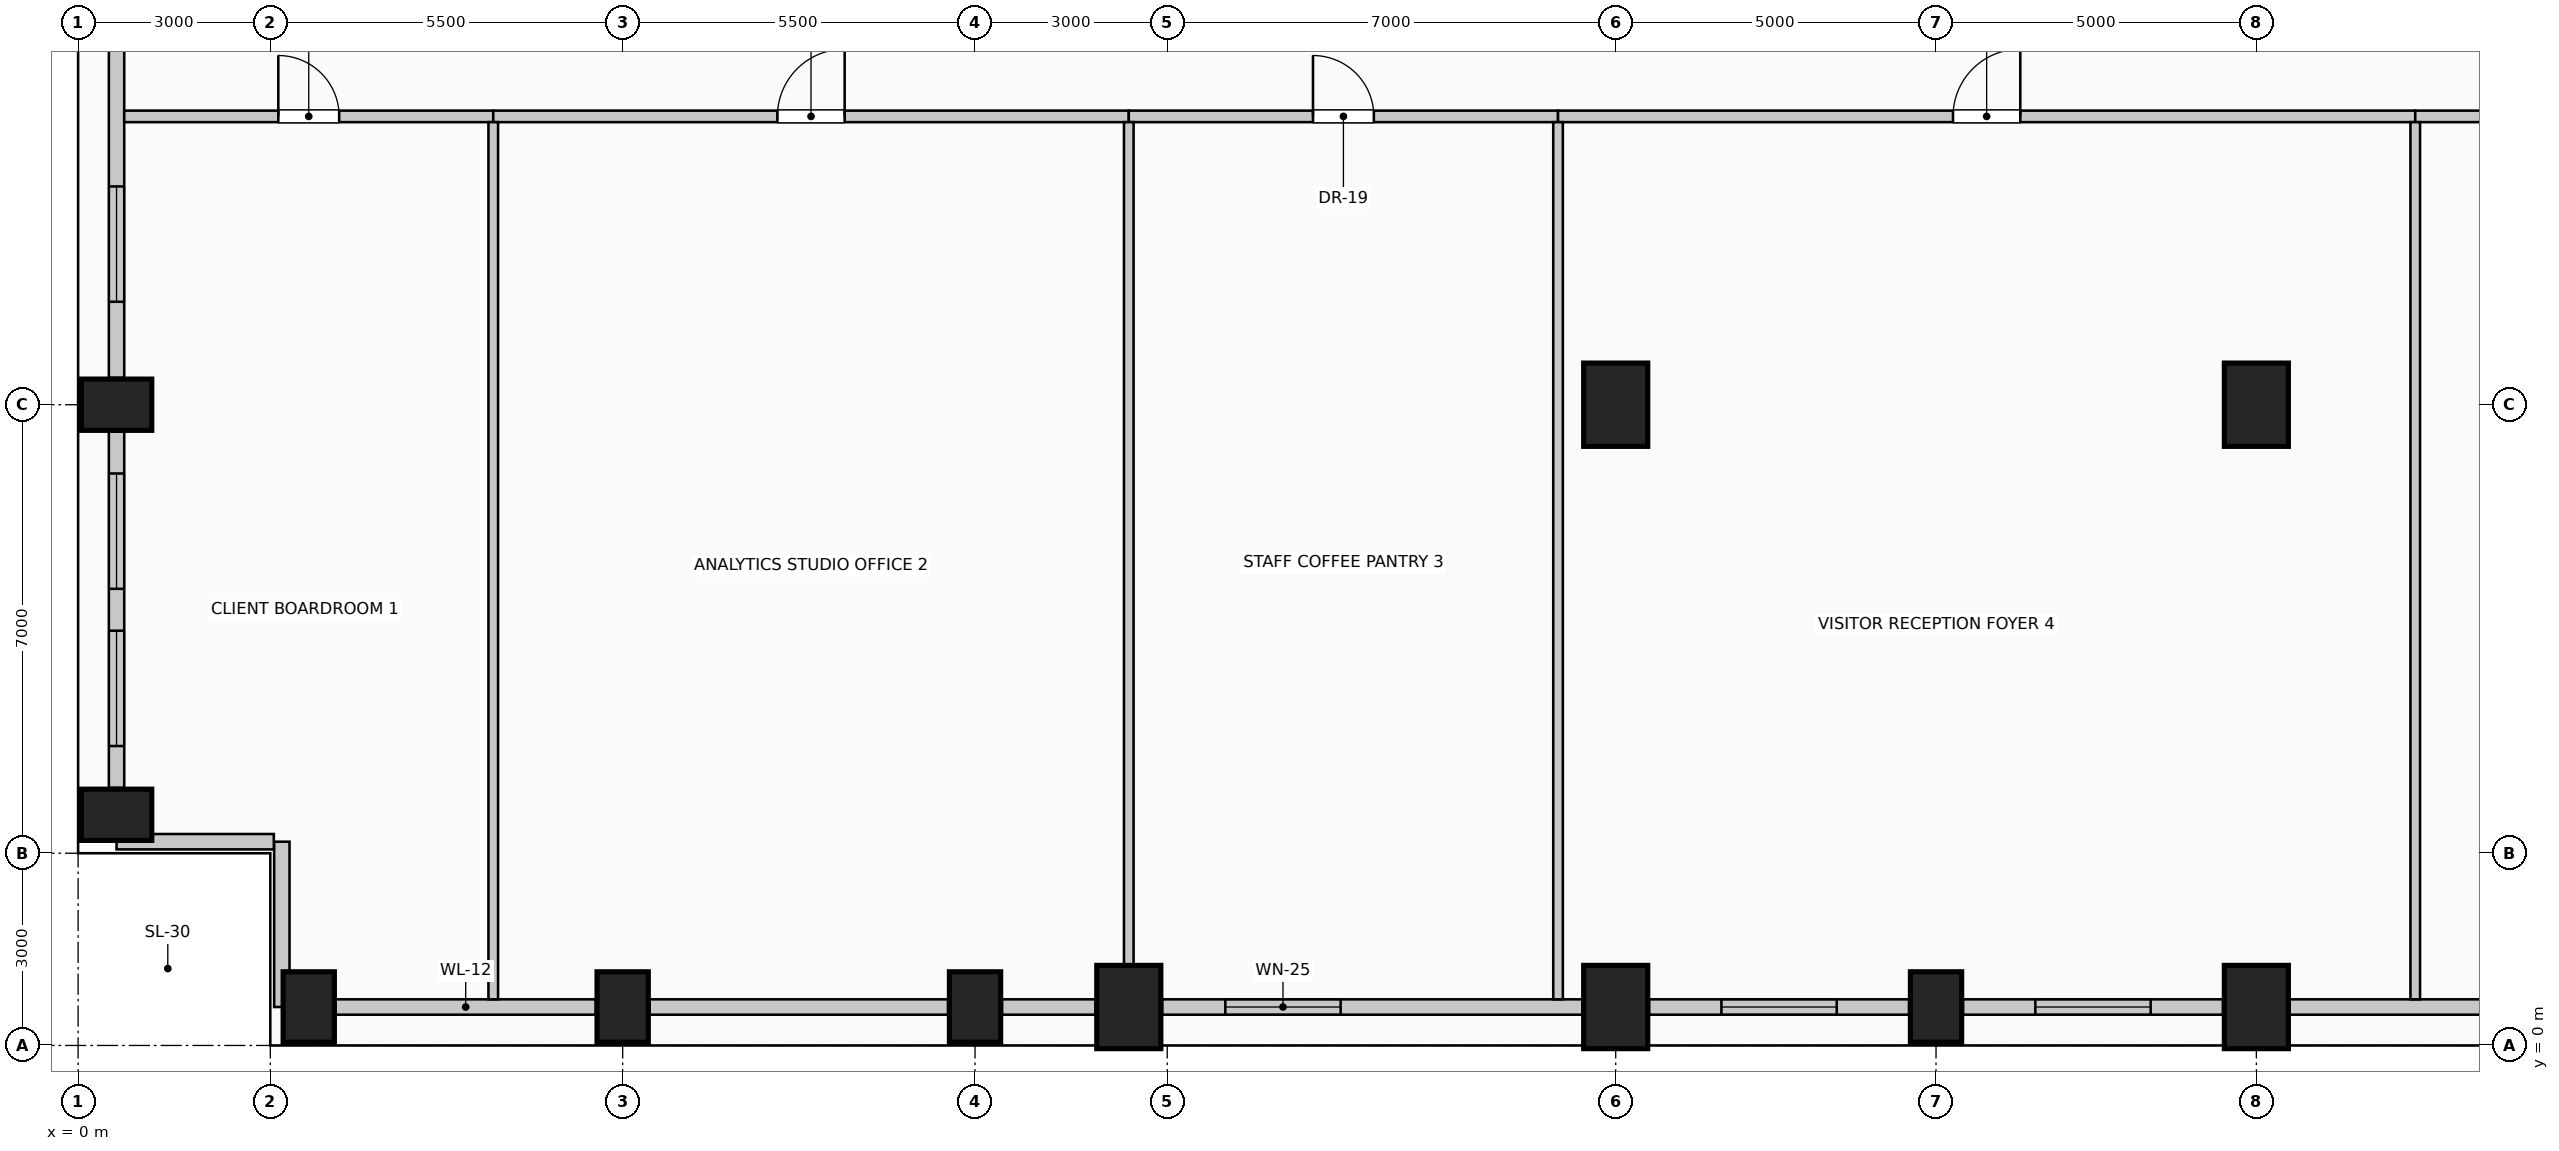
"""IFC4 building model, lengths in metres.
Left out: names, types, materials, properties, quantities, classifications, styles, units other than length and angle.
Written with IfcOpenShell. Run it as: python <this file> out.ifc"""

import sys

from ifc_helpers import new_model, si_unit, direction, frame, frame_2d, origin, origin_2d, place, context, subcontext, project, spatial, rectangle, extrude, element, fill, save


model = new_model("IFC4")
c1 = context("Model", 3, precision=1e-05, world=origin(), true_north=direction((0.0, 1.0)))
c2 = subcontext(c1, "Body", "Model", "MODEL_VIEW")
j1 = project(units=[si_unit("LENGTHUNIT", "METRE"), si_unit("PLANEANGLEUNIT", "RADIAN")], contexts=[c1])
p1 = place(None, origin())
s1 = spatial("IfcSite", under=j1, at=p1, CompositionType="ELEMENT")
p2 = place(p1, origin())
s2 = spatial("IfcBuilding", under=s1, at=p2, CompositionType="ELEMENT")
p3 = place(p2, frame((0.0, 0.0, 206.6)))
s3 = spatial("IfcBuildingStorey", under=s2, at=p3, CompositionType="ELEMENT", Elevation=206.6)
for number, where, z_axis, x_axis in (
    (1, (3.6, 0.6, 0.0), (0.0, 0.0, 1.0), (1.0, 0.0, 0.0)),
    (2, (8.5, 0.6, 0.0), (0.0, 0.0, 1.0), (1.0, 0.0, 0.0)),
    (3, (14.0, 0.6, 0.0), (0.0, 0.0, 1.0), (1.0, 0.0, 0.0)),
):
    element("IfcColumn", number, at=place(p3, frame(where, z_axis=z_axis, x_axis=x_axis)), inside=s3, PredefinedType="COLUMN", context=c2, shape_type="SweptSolid", body=[
        extrude(rectangle(XDim=0.8, YDim=1.1, at=origin_2d()), origin(), (0.0, 0.0, 1.0), 4.0),
    ])
for number, where, z_axis, x_axis in (
    (4, (16.4, 0.6, 0.0), (0.0, 0.0, 1.0), (1.0, 0.0, 0.0)),
    (5, (24.0, 0.6, 0.0), (0.0, 0.0, 1.0), (1.0, 0.0, 0.0)),
):
    element("IfcColumn", number, at=place(p3, frame(where, z_axis=z_axis, x_axis=x_axis)), inside=s3, PredefinedType="COLUMN", context=c2, shape_type="SweptSolid", body=[
        extrude(rectangle(XDim=1.0, YDim=1.3, at=origin_2d()), origin(), (0.0, 0.0, 1.0), 4.0),
    ])
p4 = place(p3, frame((29.0, 0.6, 0.0), z_axis=(0.0, 0.0, 1.0), x_axis=(1.0, 0.0, 0.0)))
e6 = element("IfcColumn", 6, at=p4, inside=s3, PredefinedType="COLUMN", context=c2, shape_type="SweptSolid", body=[
    extrude(rectangle(XDim=0.8, YDim=1.1, at=origin_2d()), origin(), (0.0, 0.0, 1.0), 4.0),
])
p5 = place(p3, frame((34.0, 0.6, 0.0), z_axis=(0.0, 0.0, 1.0), x_axis=(1.0, 0.0, 0.0)))
e7 = element("IfcColumn", 7, at=p5, inside=s3, PredefinedType="COLUMN", context=c2, shape_type="SweptSolid", body=[
    extrude(rectangle(XDim=1.0, YDim=1.3, at=origin_2d()), origin(), (0.0, 0.0, 1.0), 4.0),
])
for number, where, z_axis, x_axis in (
    (8, (0.6, 3.6, 0.0), (0.0, 0.0, 1.0), (0.0, 1.0, 0.0)),
    (9, (0.6, 10.0, 0.0), (0.0, 0.0, 1.0), (0.0, 1.0, 0.0)),
):
    element("IfcColumn", number, at=place(p3, frame(where, z_axis=z_axis, x_axis=x_axis)), inside=s3, PredefinedType="COLUMN", context=c2, shape_type="SweptSolid", body=[
        extrude(rectangle(XDim=0.8, YDim=1.1, at=origin_2d()), origin(), (0.0, 0.0, 1.0), 4.0),
    ])
for number, where, z_axis, x_axis in (
    (10, (24.0, 10.0, 0.0), (0.0, 0.0, 1.0), (1.0, 0.0, 0.0)),
    (11, (34.0, 10.0, 0.0), (0.0, 0.0, 1.0), (1.0, 0.0, 0.0)),
):
    element("IfcColumn", number, at=place(p3, frame(where, z_axis=z_axis, x_axis=x_axis)), inside=s3, PredefinedType="COLUMN", context=c2, shape_type="SweptSolid", body=[
        extrude(rectangle(XDim=1.0, YDim=1.3, at=origin_2d()), origin(), (0.0, 0.0, 1.0), 4.0),
    ])
p6 = place(p3, frame((8.08, 0.6, 0.0), z_axis=(0.0, 0.0, 1.0), x_axis=(-1.0, 0.0, 0.0)))
e12 = element("IfcWall", 12, at=p6, inside=s3, PredefinedType="SOLIDWALL", context=c2, shape_type="SweptSolid", body=[
    extrude(rectangle(XDim=4.06, YDim=0.24, at=frame_2d((2.03, 0.0))), origin(), (0.0, 0.0, 1.0), 3.0),
])
p7 = place(p3, frame((13.58, 0.6, 0.0), z_axis=(0.0, 0.0, 1.0), x_axis=(-1.0, 0.0, 0.0)))
e13 = element("IfcWall", 13, at=p7, inside=s3, PredefinedType="SOLIDWALL", context=c2, shape_type="SweptSolid", body=[
    extrude(rectangle(XDim=4.66, YDim=0.24, at=frame_2d((2.33, 0.0))), origin(), (0.0, 0.0, 1.0), 3.0),
])
p8 = place(p3, frame((15.88, 0.6, 0.0), z_axis=(0.0, 0.0, 1.0), x_axis=(-1.0, 0.0, 0.0)))
e14 = element("IfcWall", 14, at=p8, inside=s3, PredefinedType="SOLIDWALL", context=c2, shape_type="SweptSolid", body=[
    extrude(rectangle(XDim=1.46, YDim=0.24, at=frame_2d((0.73, 0.0))), origin(), (0.0, 0.0, 1.0), 3.0),
])
p9 = place(p3, frame((23.48, 0.6, 0.0), z_axis=(0.0, 0.0, 1.0), x_axis=(-1.0, 0.0, 0.0)))
e15 = element("IfcWall", 15, at=p9, inside=s3, PredefinedType="SOLIDWALL", context=c2, shape_type="SweptSolid", body=[
    extrude(rectangle(XDim=6.56, YDim=0.24, at=frame_2d((3.28, 0.0))), origin(), (0.0, 0.0, 1.0), 3.0),
])
p10 = place(p9, frame((3.773, 0.0, 0.42)))
e16 = element("IfcOpeningElement", 16, at=p10, cuts=e15, PredefinedType="OPENING", context=c2, shape_type="SweptSolid", body=[
    extrude(rectangle(XDim=1.8, YDim=2.2, at=frame_2d((0.9, 1.1))), frame((0.0, 0.13, 0.0), z_axis=(0.0, -1.0, 0.0), x_axis=(1.0, 0.0, 0.0)), (0.0, 0.0, 1.0), 0.26),
])
p11 = place(p3, frame((28.58, 0.6, 0.0), z_axis=(0.0, 0.0, 1.0), x_axis=(-1.0, 0.0, 0.0)))
e17 = element("IfcWall", 17, at=p11, inside=s3, PredefinedType="SOLIDWALL", context=c2, shape_type="SweptSolid", body=[
    extrude(rectangle(XDim=4.06, YDim=0.24, at=frame_2d((2.03, 0.0))), origin(), (0.0, 0.0, 1.0), 3.0),
])
p12 = place(p11, frame((1.13, 0.0, 0.42)))
e18 = element("IfcOpeningElement", 18, at=p12, cuts=e17, PredefinedType="OPENING", context=c2, shape_type="SweptSolid", body=[
    extrude(rectangle(XDim=1.8, YDim=2.2, at=frame_2d((0.9, 1.1))), frame((0.0, 0.13, 0.0), z_axis=(0.0, -1.0, 0.0), x_axis=(1.0, 0.0, 0.0)), (0.0, 0.0, 1.0), 0.26),
])
p13 = place(p3, frame((33.48, 0.6, 0.0), z_axis=(0.0, 0.0, 1.0), x_axis=(-1.0, 0.0, 0.0)))
e19 = element("IfcWall", 19, at=p13, inside=s3, PredefinedType="SOLIDWALL", context=c2, shape_type="SweptSolid", body=[
    extrude(rectangle(XDim=4.06, YDim=0.24, at=frame_2d((2.03, 0.0))), origin(), (0.0, 0.0, 1.0), 3.0),
])
p14 = place(p13, frame((1.13, 0.0, 0.42)))
e20 = element("IfcOpeningElement", 20, at=p14, cuts=e19, PredefinedType="OPENING", context=c2, shape_type="SweptSolid", body=[
    extrude(rectangle(XDim=1.8, YDim=2.2, at=frame_2d((0.9, 1.1))), frame((0.0, 0.13, 0.0), z_axis=(0.0, -1.0, 0.0), x_axis=(1.0, 0.0, 0.0)), (0.0, 0.0, 1.0), 0.26),
])
p15 = place(p3, frame((41.08, 0.6, 0.0), z_axis=(0.0, 0.0, 1.0), x_axis=(-1.0, 0.0, 0.0)))
e21 = element("IfcWall", 21, at=p15, inside=s3, PredefinedType="SOLIDWALL", context=c2, shape_type="SweptSolid", body=[
    extrude(rectangle(XDim=6.56, YDim=0.24, at=frame_2d((3.28, 0.0))), origin(), (0.0, 0.0, 1.0), 3.0),
])
p16 = place(p15, frame((0.987, 0.0, 0.42)))
e22 = element("IfcOpeningElement", 22, at=p16, cuts=e21, PredefinedType="OPENING", context=c2, shape_type="SweptSolid", body=[
    extrude(rectangle(XDim=1.8, YDim=2.2, at=frame_2d((0.9, 1.1))), frame((0.0, 0.13, 0.0), z_axis=(0.0, -1.0, 0.0), x_axis=(1.0, 0.0, 0.0)), (0.0, 0.0, 1.0), 0.26),
])
p17 = place(p3, frame((0.6, 4.02, 0.0), z_axis=(0.0, 0.0, 1.0), x_axis=(0.0, 1.0, 0.0)))
e23 = element("IfcWall", 23, at=p17, inside=s3, PredefinedType="SOLIDWALL", context=c2, shape_type="SweptSolid", body=[
    extrude(rectangle(XDim=5.56, YDim=0.24, at=frame_2d((2.78, 0.0))), origin(), (0.0, 0.0, 1.0), 3.0),
])
p18 = place(p17, frame((0.653, 0.0, 0.42)))
e24 = element("IfcOpeningElement", 24, at=p18, cuts=e23, PredefinedType="OPENING", context=c2, shape_type="SweptSolid", body=[
    extrude(rectangle(XDim=1.8, YDim=2.2, at=frame_2d((0.9, 1.1))), frame((0.0, 0.13, 0.0), z_axis=(0.0, -1.0, 0.0), x_axis=(1.0, 0.0, 0.0)), (0.0, 0.0, 1.0), 0.26),
])
p19 = place(p17, frame((3.107, 0.0, 0.42)))
e25 = element("IfcOpeningElement", 25, at=p19, cuts=e23, PredefinedType="OPENING", context=c2, shape_type="SweptSolid", body=[
    extrude(rectangle(XDim=1.8, YDim=2.2, at=frame_2d((0.9, 1.1))), frame((0.0, 0.13, 0.0), z_axis=(0.0, -1.0, 0.0), x_axis=(1.0, 0.0, 0.0)), (0.0, 0.0, 1.0), 0.26),
])
p20 = place(p3, frame((0.6, 10.42, 0.0), z_axis=(0.0, 0.0, 1.0), x_axis=(0.0, 1.0, 0.0)))
e26 = element("IfcWall", 26, at=p20, inside=s3, PredefinedType="SOLIDWALL", context=c2, shape_type="SweptSolid", body=[
    extrude(rectangle(XDim=7.16, YDim=0.24, at=frame_2d((3.58, 0.0))), origin(), (0.0, 0.0, 1.0), 3.0),
])
p21 = place(p20, frame((1.187, 0.0, 0.42)))
e27 = element("IfcOpeningElement", 27, at=p21, cuts=e26, PredefinedType="OPENING", context=c2, shape_type="SweptSolid", body=[
    extrude(rectangle(XDim=1.8, YDim=2.2, at=frame_2d((0.9, 1.1))), frame((0.0, 0.13, 0.0), z_axis=(0.0, -1.0, 0.0), x_axis=(1.0, 0.0, 0.0)), (0.0, 0.0, 1.0), 0.26),
])
p22 = place(p3, frame((3.18, 0.6, 0.0), z_axis=(0.0, 0.0, 1.0), x_axis=(0.0, 1.0, 0.0)))
e28 = element("IfcWall", 28, at=p22, inside=s3, PredefinedType="SOLIDWALL", context=c2, shape_type="SweptSolid", body=[
    extrude(rectangle(XDim=2.58, YDim=0.24, at=frame_2d((1.29, 0.0))), origin(), (0.0, 0.0, 1.0), 3.75),
])
p23 = place(p3, frame((3.055, 3.18, 0.0), z_axis=(0.0, 0.0, 1.0), x_axis=(-1.0, 0.0, 0.0)))
e29 = element("IfcWall", 29, at=p23, inside=s3, PredefinedType="SOLIDWALL", context=c2, shape_type="SweptSolid", body=[
    extrude(rectangle(XDim=2.455, YDim=0.24, at=frame_2d((1.228, 0.0))), origin(), (0.0, 0.0, 1.0), 3.75),
])
p24 = place(p3, frame((0.72, 14.5, 0.0), z_axis=(0.0, 0.0, 1.0), x_axis=(1.0, 0.0, 0.0)))
e30 = element("IfcWall", 30, at=p24, inside=s3, PredefinedType="PARTITIONING", context=c2, shape_type="SweptSolid", body=[
    extrude(rectangle(XDim=5.76, YDim=0.18, at=frame_2d((2.88, 0.0))), origin(), (0.0, 0.0, 1.0), 3.75),
])
p25 = place(p24, frame((2.405, 0.0, 0.0)))
e31 = element("IfcOpeningElement", 31, at=p25, cuts=e30, PredefinedType="OPENING", context=c2, shape_type="SweptSolid", body=[
    extrude(rectangle(XDim=0.95, YDim=2.15, at=frame_2d((0.475, 1.075))), frame((0.0, 0.1, 0.0), z_axis=(0.0, -1.0, 0.0), x_axis=(1.0, 0.0, 0.0)), (0.0, 0.0, 1.0), 0.2),
])
p26 = place(p3, frame((6.48, 14.5, 0.0), z_axis=(0.0, 0.0, 1.0), x_axis=(1.0, 0.0, 0.0)))
e32 = element("IfcWall", 32, at=p26, inside=s3, PredefinedType="PARTITIONING", context=c2, shape_type="SweptSolid", body=[
    extrude(rectangle(XDim=9.92, YDim=0.18, at=frame_2d((4.96, 0.0))), origin(), (0.0, 0.0, 1.0), 3.75),
])
p27 = place(p26, frame((4.435, 0.0, 0.0)))
e33 = element("IfcOpeningElement", 33, at=p27, cuts=e32, PredefinedType="OPENING", context=c2, shape_type="SweptSolid", body=[
    extrude(rectangle(XDim=1.05, YDim=2.15, at=frame_2d((0.525, 1.075))), frame((0.0, 0.1, 0.0), z_axis=(0.0, -1.0, 0.0), x_axis=(1.0, 0.0, 0.0)), (0.0, 0.0, 1.0), 0.2),
])
p28 = place(p3, frame((16.4, 14.5, 0.0), z_axis=(0.0, 0.0, 1.0), x_axis=(1.0, 0.0, 0.0)))
e34 = element("IfcWall", 34, at=p28, inside=s3, PredefinedType="PARTITIONING", context=c2, shape_type="SweptSolid", body=[
    extrude(rectangle(XDim=6.7, YDim=0.18, at=frame_2d((3.35, 0.0))), origin(), (0.0, 0.0, 1.0), 3.75),
])
p29 = place(p28, frame((2.875, 0.0, 0.0)))
e35 = element("IfcOpeningElement", 35, at=p29, cuts=e34, PredefinedType="OPENING", context=c2, shape_type="SweptSolid", body=[
    extrude(rectangle(XDim=0.95, YDim=2.15, at=frame_2d((0.475, 1.075))), frame((0.0, 0.1, 0.0), z_axis=(0.0, -1.0, 0.0), x_axis=(1.0, 0.0, 0.0)), (0.0, 0.0, 1.0), 0.2),
])
p30 = place(p3, frame((23.1, 14.5, 0.0), z_axis=(0.0, 0.0, 1.0), x_axis=(1.0, 0.0, 0.0)))
e36 = element("IfcWall", 36, at=p30, inside=s3, PredefinedType="PARTITIONING", context=c2, shape_type="SweptSolid", body=[
    extrude(rectangle(XDim=13.38, YDim=0.18, at=frame_2d((6.69, 0.0))), origin(), (0.0, 0.0, 1.0), 3.75),
])
p31 = place(p30, frame((6.165, 0.0, 0.0)))
e37 = element("IfcOpeningElement", 37, at=p31, cuts=e36, PredefinedType="OPENING", context=c2, shape_type="SweptSolid", body=[
    extrude(rectangle(XDim=1.05, YDim=2.15, at=frame_2d((0.525, 1.075))), frame((0.0, 0.1, 0.0), z_axis=(0.0, -1.0, 0.0), x_axis=(1.0, 0.0, 0.0)), (0.0, 0.0, 1.0), 0.2),
])
p32 = place(p3, frame((36.48, 14.5, 0.0), z_axis=(0.0, 0.0, 1.0), x_axis=(1.0, 0.0, 0.0)))
e38 = element("IfcWall", 38, at=p32, inside=s3, PredefinedType="PARTITIONING", context=c2, shape_type="SweptSolid", body=[
    extrude(rectangle(XDim=10.0, YDim=0.18, at=frame_2d((5.0, 0.0))), origin(), (0.0, 0.0, 1.0), 3.75),
])
p33 = place(p32, frame((4.56, 0.0, 0.0)))
e39 = element("IfcOpeningElement", 39, at=p33, cuts=e38, PredefinedType="OPENING", context=c2, shape_type="SweptSolid", body=[
    extrude(rectangle(XDim=0.88, YDim=2.1, at=frame_2d((0.44, 1.05))), frame((0.0, 0.1, 0.0), z_axis=(0.0, -1.0, 0.0), x_axis=(1.0, 0.0, 0.0)), (0.0, 0.0, 1.0), 0.2),
])
p34 = place(p3, frame((6.48, 0.72, 0.0), z_axis=(0.0, 0.0, 1.0), x_axis=(0.0, 1.0, 0.0)))
e40 = element("IfcWall", 40, at=p34, inside=s3, PredefinedType="PARTITIONING", context=c2, shape_type="SweptSolid", body=[
    extrude(rectangle(XDim=13.69, YDim=0.15, at=frame_2d((6.845, 0.0))), origin(), (0.0, 0.0, 1.0), 3.75),
])
p35 = place(p3, frame((16.4, 1.25, 0.0), z_axis=(0.0, 0.0, 1.0), x_axis=(0.0, 1.0, 0.0)))
e41 = element("IfcWall", 41, at=p35, inside=s3, PredefinedType="PARTITIONING", context=c2, shape_type="SweptSolid", body=[
    extrude(rectangle(XDim=13.16, YDim=0.15, at=frame_2d((6.58, 0.0))), origin(), (0.0, 0.0, 1.0), 3.145),
])
for number, where, z_axis, x_axis in (
    (42, (23.1, 0.72, 0.0), (0.0, 0.0, 1.0), (0.0, 1.0, 0.0)),
    (43, (36.48, 0.72, 0.0), (0.0, 0.0, 1.0), (0.0, 1.0, 0.0)),
):
    element("IfcWall", number, at=place(p3, frame(where, z_axis=z_axis, x_axis=x_axis)), inside=s3, PredefinedType="PARTITIONING", context=c2, shape_type="SweptSolid", body=[
        extrude(rectangle(XDim=13.69, YDim=0.15, at=frame_2d((6.845, 0.0))), origin(), (0.0, 0.0, 1.0), 3.75),
    ])
p36 = place(p10, origin())
e44 = element("IfcWindow", 44, at=p36, inside=s3, PartitioningType="SINGLE_PANEL", PredefinedType="WINDOW", context=c2, shape_type="SweptSolid", body=[
    extrude(rectangle(XDim=1.8, YDim=2.2, at=frame_2d((0.9, 1.1))), frame((0.0, 0.03, 0.0), z_axis=(0.0, -1.0, 0.0), x_axis=(1.0, 0.0, 0.0)), (0.0, 0.0, 1.0), 0.06),
])
fill(e16, e44)
p37 = place(p12, origin())
e45 = element("IfcWindow", 45, at=p37, inside=s3, PartitioningType="SINGLE_PANEL", PredefinedType="WINDOW", context=c2, shape_type="SweptSolid", body=[
    extrude(rectangle(XDim=1.8, YDim=2.2, at=frame_2d((0.9, 1.1))), frame((0.0, 0.03, 0.0), z_axis=(0.0, -1.0, 0.0), x_axis=(1.0, 0.0, 0.0)), (0.0, 0.0, 1.0), 0.06),
])
fill(e18, e45)
p38 = place(p14, origin())
e46 = element("IfcWindow", 46, at=p38, inside=s3, PartitioningType="SINGLE_PANEL", PredefinedType="WINDOW", context=c2, shape_type="SweptSolid", body=[
    extrude(rectangle(XDim=1.8, YDim=2.2, at=frame_2d((0.9, 1.1))), frame((0.0, 0.03, 0.0), z_axis=(0.0, -1.0, 0.0), x_axis=(1.0, 0.0, 0.0)), (0.0, 0.0, 1.0), 0.06),
])
fill(e20, e46)
p39 = place(p18, origin())
e47 = element("IfcWindow", 47, at=p39, inside=s3, PartitioningType="SINGLE_PANEL", PredefinedType="WINDOW", context=c2, shape_type="SweptSolid", body=[
    extrude(rectangle(XDim=1.8, YDim=2.2, at=frame_2d((0.9, 1.1))), frame((0.0, 0.03, 0.0), z_axis=(0.0, -1.0, 0.0), x_axis=(1.0, 0.0, 0.0)), (0.0, 0.0, 1.0), 0.06),
])
fill(e24, e47)
p40 = place(p19, origin())
e48 = element("IfcWindow", 48, at=p40, inside=s3, PartitioningType="SINGLE_PANEL", PredefinedType="WINDOW", context=c2, shape_type="SweptSolid", body=[
    extrude(rectangle(XDim=1.8, YDim=2.2, at=frame_2d((0.9, 1.1))), frame((0.0, 0.03, 0.0), z_axis=(0.0, -1.0, 0.0), x_axis=(1.0, 0.0, 0.0)), (0.0, 0.0, 1.0), 0.06),
])
fill(e25, e48)
p41 = place(p21, origin())
e49 = element("IfcWindow", 49, at=p41, inside=s3, PartitioningType="SINGLE_PANEL", PredefinedType="WINDOW", context=c2, shape_type="SweptSolid", body=[
    extrude(rectangle(XDim=1.8, YDim=2.2, at=frame_2d((0.9, 1.1))), frame((0.0, 0.03, 0.0), z_axis=(0.0, -1.0, 0.0), x_axis=(1.0, 0.0, 0.0)), (0.0, 0.0, 1.0), 0.06),
])
fill(e27, e49)
p42 = place(p25, origin())
e50 = element("IfcDoor", 50, at=p42, inside=s3, OperationType="SINGLE_SWING_LEFT", PredefinedType="DOOR", context=c2, shape_type="SweptSolid", body=[
    extrude(rectangle(XDim=0.95, YDim=2.15, at=frame_2d((0.475, 1.075))), frame((0.0, 0.025, 0.0), z_axis=(0.0, -1.0, 0.0), x_axis=(1.0, 0.0, 0.0)), (0.0, 0.0, 1.0), 0.05),
])
fill(e31, e50)
p43 = place(p27, origin())
e51 = element("IfcDoor", 51, at=p43, inside=s3, OperationType="SINGLE_SWING_RIGHT", PredefinedType="DOOR", context=c2, shape_type="SweptSolid", body=[
    extrude(rectangle(XDim=1.05, YDim=2.15, at=frame_2d((0.525, 1.075))), frame((0.0, 0.025, 0.0), z_axis=(0.0, -1.0, 0.0), x_axis=(1.0, 0.0, 0.0)), (0.0, 0.0, 1.0), 0.05),
])
fill(e33, e51)
p44 = place(p29, origin())
e52 = element("IfcDoor", 52, at=p44, inside=s3, OperationType="SINGLE_SWING_LEFT", PredefinedType="DOOR", context=c2, shape_type="SweptSolid", body=[
    extrude(rectangle(XDim=0.95, YDim=2.15, at=frame_2d((0.475, 1.075))), frame((0.0, 0.025, 0.0), z_axis=(0.0, -1.0, 0.0), x_axis=(1.0, 0.0, 0.0)), (0.0, 0.0, 1.0), 0.05),
])
fill(e35, e52)
p45 = place(p31, origin())
e53 = element("IfcDoor", 53, at=p45, inside=s3, OperationType="SINGLE_SWING_RIGHT", PredefinedType="DOOR", context=c2, shape_type="SweptSolid", body=[
    extrude(rectangle(XDim=1.05, YDim=2.15, at=frame_2d((0.525, 1.075))), frame((0.0, 0.025, 0.0), z_axis=(0.0, -1.0, 0.0), x_axis=(1.0, 0.0, 0.0)), (0.0, 0.0, 1.0), 0.05),
])
fill(e37, e53)
save(model, sys.argv[1])
